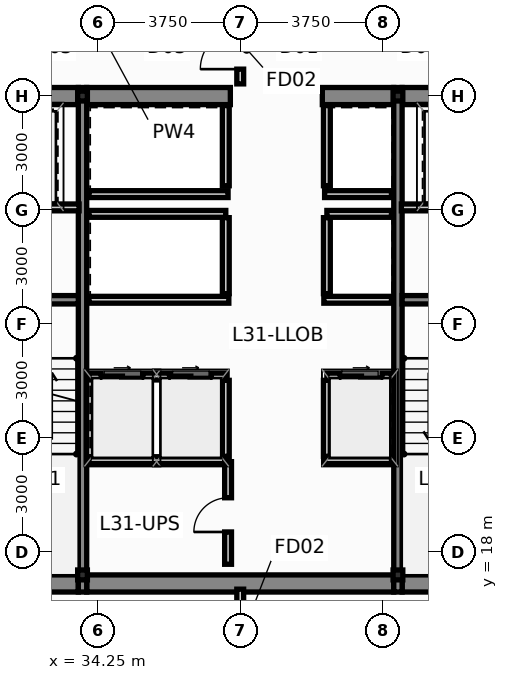
"""IFC4 building model, lengths in metres.
Left out: names, types, materials, properties, quantities, classifications, styles, units other than length and angle.
Written with IfcOpenShell. Run it as: python <this file> out.ifc"""

import sys

from ifc_helpers import new_model, si_unit, direction, frame, frame_2d, origin, origin_2d, place, context, subcontext, project, spatial, rectangle, i_section, extrude, source, transform, mapped, element, fill, save


model = new_model("IFC4")
c1 = context("Model", 3, precision=1e-05, world=origin(), true_north=direction((0.0, 1.0)))
c2 = subcontext(c1, "Body", "Model", "MODEL_VIEW")
j1 = project(units=[si_unit("LENGTHUNIT", "METRE"), si_unit("PLANEANGLEUNIT", "RADIAN")], contexts=[c1])
p1 = place(None, origin())
s1 = spatial("IfcSite", under=j1, at=p1, CompositionType="ELEMENT")
p2 = place(p1, origin())
s2 = spatial("IfcBuilding", under=s1, at=p2, CompositionType="ELEMENT")
p3 = place(p2, frame((0.0, 0.0, 120.0)))
s3 = spatial("IfcBuildingStorey", under=s2, at=p3, CompositionType="ELEMENT", Elevation=120.0)
m1 = source(origin(), c2, "Body", "SweptSolid", [
    extrude(i_section(OverallWidth=0.256, OverallDepth=0.26, WebThickness=0.01, FlangeThickness=0.017, at=origin_2d()), origin(), (0.0, 0.0, 1.0), 3.65),
])
for number, where, z_axis, x_axis in (
    (1, (33.85, 17.4, 0.0), (0.0, 0.0, 1.0), (1.0, 0.0, 0.0)),
    (2, (42.15, 17.4, 0.0), (0.0, 0.0, 1.0), (1.0, 0.0, 0.0)),
    (3, (33.85, 30.0, 0.0), (0.0, 0.0, 1.0), (1.0, 0.0, 0.0)),
    (4, (42.15, 30.0, 0.0), (0.0, 0.0, 1.0), (1.0, 0.0, 0.0)),
):
    element("IfcColumn", number, at=place(p3, frame(where, z_axis=z_axis, x_axis=x_axis)), inside=s3, PredefinedType="COLUMN", context=c2, shape_type="MappedRepresentation", body=[
        mapped(m1, transform((0.0, 0.0, 0.0), scale=1.0)),
    ])
p4 = place(p3, frame((30.84, 17.175, 0.0), z_axis=(0.0, 0.0, 1.0), x_axis=(1.0, 0.0, 0.0)))
e5 = element("IfcWall", 5, at=p4, inside=s3, PredefinedType="SHEAR", context=c2, shape_type="SweptSolid", body=[
    extrude(rectangle(XDim=2.9, YDim=0.45, at=frame_2d((1.45, 0.0))), origin(), (0.0, 0.0, 1.0), 3.65),
])
p5 = place(p3, frame((33.96, 17.175, 0.0), z_axis=(0.0, 0.0, 1.0), x_axis=(1.0, 0.0, 0.0)))
e6 = element("IfcWall", 6, at=p5, inside=s3, PredefinedType="SHEAR", context=c2, shape_type="SweptSolid", body=[
    extrude(rectangle(XDim=8.08, YDim=0.45, at=frame_2d((4.04, 0.0))), origin(), (0.0, 0.0, 1.0), 3.65),
])
for number, where, z_axis, x_axis in (
    (7, (42.26, 17.175, 0.0), (0.0, 0.0, 1.0), (1.0, 0.0, 0.0)),
    (8, (30.84, 30.0, 0.0), (0.0, 0.0, 1.0), (1.0, 0.0, 0.0)),
):
    element("IfcWall", number, at=place(p3, frame(where, z_axis=z_axis, x_axis=x_axis)), inside=s3, PredefinedType="SHEAR", context=c2, shape_type="SweptSolid", body=[
        extrude(rectangle(XDim=2.9, YDim=0.45, at=frame_2d((1.45, 0.0))), origin(), (0.0, 0.0, 1.0), 3.65),
    ])
p6 = place(p3, frame((33.96, 30.0, 0.0), z_axis=(0.0, 0.0, 1.0), x_axis=(1.0, 0.0, 0.0)))
e9 = element("IfcWall", 9, at=p6, inside=s3, PredefinedType="SHEAR", context=c2, shape_type="SweptSolid", body=[
    extrude(rectangle(XDim=3.78, YDim=0.45, at=frame_2d((1.89, 0.0))), origin(), (0.0, 0.0, 1.0), 3.65),
])
p7 = place(p3, frame((40.16, 30.0, 0.0), z_axis=(0.0, 0.0, 1.0), x_axis=(1.0, 0.0, 0.0)))
e10 = element("IfcWall", 10, at=p7, inside=s3, PredefinedType="SHEAR", context=c2, shape_type="SweptSolid", body=[
    extrude(rectangle(XDim=1.88, YDim=0.45, at=frame_2d((0.94, 0.0))), origin(), (0.0, 0.0, 1.0), 3.65),
])
p8 = place(p3, frame((42.26, 30.0, 0.0), z_axis=(0.0, 0.0, 1.0), x_axis=(1.0, 0.0, 0.0)))
e11 = element("IfcWall", 11, at=p8, inside=s3, PredefinedType="SHEAR", context=c2, shape_type="SweptSolid", body=[
    extrude(rectangle(XDim=2.9, YDim=0.45, at=frame_2d((1.45, 0.0))), origin(), (0.0, 0.0, 1.0), 3.65),
])
for number, where, z_axis, x_axis in (
    (12, (33.85, 16.95, 0.0), (0.0, 0.0, 1.0), (0.0, 1.0, 0.0)),
    (13, (42.15, 16.95, 0.0), (0.0, 0.0, 1.0), (0.0, 1.0, 0.0)),
):
    element("IfcWall", number, at=place(p3, frame(where, z_axis=z_axis, x_axis=x_axis)), inside=s3, PredefinedType="SHEAR", context=c2, shape_type="SweptSolid", body=[
        extrude(rectangle(XDim=13.275, YDim=0.22, at=frame_2d((6.638, 0.0))), origin(), (0.0, 0.0, 1.0), 3.65),
    ])
for number, where, z_axis, x_axis in (
    (14, (30.84, 24.64, 0.0), (0.0, 0.0, 1.0), (1.0, 0.0, 0.0)),
    (15, (42.26, 24.64, 0.0), (0.0, 0.0, 1.0), (1.0, 0.0, 0.0)),
):
    element("IfcWall", number, at=place(p3, frame(where, z_axis=z_axis, x_axis=x_axis)), inside=s3, PredefinedType="SHEAR", context=c2, shape_type="SweptSolid", body=[
        extrude(rectangle(XDim=2.9, YDim=0.22, at=frame_2d((1.45, 0.0))), origin(), (0.0, 0.0, 1.0), 3.65),
    ])
p9 = place(p3, frame((34.02, 22.62, 0.0), z_axis=(0.0, 0.0, 1.0), x_axis=(1.0, 0.0, 0.0)))
e16 = element("IfcWall", 16, at=p9, inside=s3, PredefinedType="PARTITIONING", context=c2, shape_type="SweptSolid", body=[
    extrude(rectangle(XDim=3.6, YDim=0.18, at=frame_2d((1.8, 0.0))), origin(), (0.0, 0.0, 1.0), 3.4),
])
p10 = place(p9, frame((0.32, 0.0, 0.0)))
e17 = element("IfcOpeningElement", 17, at=p10, cuts=e16, PredefinedType="OPENING", context=c2, shape_type="SweptSolid", body=[
    extrude(rectangle(XDim=1.1, YDim=2.2, at=frame_2d((0.55, 1.1))), frame((0.0, 0.102, 0.0), z_axis=(0.0, -1.0, 0.0), x_axis=(1.0, 0.0, 0.0)), (0.0, 0.0, 1.0), 0.204),
])
p11 = place(p9, frame((2.12, 0.0, 0.0)))
e18 = element("IfcOpeningElement", 18, at=p11, cuts=e16, PredefinedType="OPENING", context=c2, shape_type="SweptSolid", body=[
    extrude(rectangle(XDim=1.1, YDim=2.2, at=frame_2d((0.55, 1.1))), frame((0.0, 0.102, 0.0), z_axis=(0.0, -1.0, 0.0), x_axis=(1.0, 0.0, 0.0)), (0.0, 0.0, 1.0), 0.204),
])
p12 = place(p3, frame((40.28, 22.62, 0.0), z_axis=(0.0, 0.0, 1.0), x_axis=(1.0, 0.0, 0.0)))
e19 = element("IfcWall", 19, at=p12, inside=s3, PredefinedType="PARTITIONING", context=c2, shape_type="SweptSolid", body=[
    extrude(rectangle(XDim=1.7, YDim=0.18, at=frame_2d((0.85, 0.0))), origin(), (0.0, 0.0, 1.0), 3.4),
])
p13 = place(p12, frame((0.35, 0.0, 0.0)))
e20 = element("IfcOpeningElement", 20, at=p13, cuts=e19, PredefinedType="OPENING", context=c2, shape_type="SweptSolid", body=[
    extrude(rectangle(XDim=1.1, YDim=2.2, at=frame_2d((0.55, 1.1))), frame((0.0, 0.102, 0.0), z_axis=(0.0, -1.0, 0.0), x_axis=(1.0, 0.0, 0.0)), (0.0, 0.0, 1.0), 0.204),
])
for number, where, z_axis, x_axis in (
    (21, (37.62, 20.52, 0.0), (0.0, 0.0, 1.0), (0.0, 1.0, 0.0)),
    (22, (40.28, 20.52, 0.0), (0.0, 0.0, 1.0), (0.0, 1.0, 0.0)),
):
    element("IfcWall", number, at=place(p3, frame(where, z_axis=z_axis, x_axis=x_axis)), inside=s3, PredefinedType="PARTITIONING", context=c2, shape_type="SweptSolid", body=[
        extrude(rectangle(XDim=2.0, YDim=0.18, at=frame_2d((1.0, 0.0))), origin(), (0.0, 0.0, 1.0), 3.4),
    ])
p14 = place(p3, frame((34.02, 26.9, 0.0), z_axis=(0.0, 0.0, 1.0), x_axis=(1.0, 0.0, 0.0)))
e23 = element("IfcWall", 23, at=p14, inside=s3, PredefinedType="PARTITIONING", context=c2, shape_type="SweptSolid", body=[
    extrude(rectangle(XDim=3.6, YDim=0.18, at=frame_2d((1.8, 0.0))), origin(), (0.0, 0.0, 1.0), 3.4),
])
p15 = place(p3, frame((40.28, 26.9, 0.0), z_axis=(0.0, 0.0, 1.0), x_axis=(1.0, 0.0, 0.0)))
e24 = element("IfcWall", 24, at=p15, inside=s3, PredefinedType="PARTITIONING", context=c2, shape_type="SweptSolid", body=[
    extrude(rectangle(XDim=1.7, YDim=0.18, at=frame_2d((0.85, 0.0))), origin(), (0.0, 0.0, 1.0), 3.4),
])
for number, where, z_axis, x_axis in (
    (25, (37.62, 24.8, 0.0), (0.0, 0.0, 1.0), (0.0, 1.0, 0.0)),
    (26, (40.28, 24.8, 0.0), (0.0, 0.0, 1.0), (0.0, 1.0, 0.0)),
):
    element("IfcWall", number, at=place(p3, frame(where, z_axis=z_axis, x_axis=x_axis)), inside=s3, PredefinedType="PARTITIONING", context=c2, shape_type="SweptSolid", body=[
        extrude(rectangle(XDim=2.0, YDim=0.18, at=frame_2d((1.0, 0.0))), origin(), (0.0, 0.0, 1.0), 3.4),
    ])
p16 = place(p3, frame((34.02, 24.64, 0.0), z_axis=(0.0, 0.0, 1.0), x_axis=(1.0, 0.0, 0.0)))
e27 = element("IfcWall", 27, at=p16, inside=s3, PredefinedType="PARTITIONING", context=c2, shape_type="SweptSolid", body=[
    extrude(rectangle(XDim=3.68, YDim=0.18, at=frame_2d((1.84, 0.0))), origin(), (0.0, 0.0, 1.0), 3.4),
])
p17 = place(p3, frame((40.2, 24.64, 0.0), z_axis=(0.0, 0.0, 1.0), x_axis=(1.0, 0.0, 0.0)))
e28 = element("IfcWall", 28, at=p17, inside=s3, PredefinedType="PARTITIONING", context=c2, shape_type="SweptSolid", body=[
    extrude(rectangle(XDim=1.78, YDim=0.18, at=frame_2d((0.89, 0.0))), origin(), (0.0, 0.0, 1.0), 3.4),
])
p18 = place(p3, frame((34.02, 27.42, 0.0), z_axis=(0.0, 0.0, 1.0), x_axis=(1.0, 0.0, 0.0)))
e29 = element("IfcWall", 29, at=p18, inside=s3, PredefinedType="PARTITIONING", context=c2, shape_type="SweptSolid", body=[
    extrude(rectangle(XDim=3.66, YDim=0.18, at=frame_2d((1.83, 0.0))), origin(), (0.0, 0.0, 1.0), 3.4),
])
p19 = place(p3, frame((40.22, 27.42, 0.0), z_axis=(0.0, 0.0, 1.0), x_axis=(1.0, 0.0, 0.0)))
e30 = element("IfcWall", 30, at=p19, inside=s3, PredefinedType="PARTITIONING", context=c2, shape_type="SweptSolid", body=[
    extrude(rectangle(XDim=1.76, YDim=0.18, at=frame_2d((0.88, 0.0))), origin(), (0.0, 0.0, 1.0), 3.4),
])
for number, where, z_axis, x_axis in (
    (31, (37.62, 27.64, 0.0), (0.0, 0.0, 1.0), (0.0, 1.0, 0.0)),
    (32, (40.28, 27.64, 0.0), (0.0, 0.0, 1.0), (0.0, 1.0, 0.0)),
):
    element("IfcWall", number, at=place(p3, frame(where, z_axis=z_axis, x_axis=x_axis)), inside=s3, PredefinedType="PARTITIONING", context=c2, shape_type="SweptSolid", body=[
        extrude(rectangle(XDim=2.11, YDim=0.18, at=frame_2d((1.055, 0.0))), origin(), (0.0, 0.0, 1.0), 3.4),
    ])
for number, where, z_axis, x_axis in (
    (33, (30.86, 27.07, 0.0), (0.0, 0.0, 1.0), (1.0, 0.0, 0.0)),
    (34, (42.24, 27.07, 0.0), (0.0, 0.0, 1.0), (1.0, 0.0, 0.0)),
):
    element("IfcWall", number, at=place(p3, frame(where, z_axis=z_axis, x_axis=x_axis)), inside=s3, PredefinedType="PARTITIONING", context=c2, shape_type="SweptSolid", body=[
        extrude(rectangle(XDim=2.9, YDim=0.18, at=frame_2d((1.45, 0.0))), origin(), (0.0, 0.0, 1.0), 3.4),
    ])
p20 = place(p3, frame((34.02, 20.42, 0.0), z_axis=(0.0, 0.0, 1.0), x_axis=(1.0, 0.0, 0.0)))
e35 = element("IfcWall", 35, at=p20, inside=s3, PredefinedType="PARTITIONING", context=c2, shape_type="SweptSolid", body=[
    extrude(rectangle(XDim=3.64, YDim=0.18, at=frame_2d((1.82, 0.0))), origin(), (0.0, 0.0, 1.0), 3.4),
])
p21 = place(p3, frame((40.22, 20.42, 0.0), z_axis=(0.0, 0.0, 1.0), x_axis=(1.0, 0.0, 0.0)))
e36 = element("IfcWall", 36, at=p21, inside=s3, PredefinedType="PARTITIONING", context=c2, shape_type="SweptSolid", body=[
    extrude(rectangle(XDim=1.76, YDim=0.18, at=frame_2d((0.88, 0.0))), origin(), (0.0, 0.0, 1.0), 3.4),
])
p22 = place(p3, frame((37.68, 17.68, 0.0), z_axis=(0.0, 0.0, 1.0), x_axis=(0.0, 1.0, 0.0)))
e37 = element("IfcWall", 37, at=p22, inside=s3, PredefinedType="PARTITIONING", context=c2, shape_type="SweptSolid", body=[
    extrude(rectangle(XDim=2.7, YDim=0.18, at=frame_2d((1.35, 0.0))), origin(), (0.0, 0.0, 1.0), 3.4),
])
p23 = place(p22, frame((0.85, 0.0, 0.0)))
e38 = element("IfcOpeningElement", 38, at=p23, cuts=e37, PredefinedType="OPENING", context=c2, shape_type="SweptSolid", body=[
    extrude(rectangle(XDim=0.9, YDim=2.1, at=frame_2d((0.45, 1.05))), frame((0.0, 0.102, 0.0), z_axis=(0.0, -1.0, 0.0), x_axis=(1.0, 0.0, 0.0)), (0.0, 0.0, 1.0), 0.204),
])
p24 = place(p3, frame((38.0, 15.205, 0.0), z_axis=(0.0, 0.0, 1.0), x_axis=(0.0, 1.0, 0.0)))
e39 = element("IfcWall", 39, at=p24, inside=s3, PredefinedType="PARTITIONING", context=c2, shape_type="SweptSolid", body=[
    extrude(rectangle(XDim=1.82, YDim=0.18, at=frame_2d((0.91, 0.0))), origin(), (0.0, 0.0, 1.0), 3.4),
])
p25 = place(p24, frame((0.385, 0.0, 0.0)))
e40 = element("IfcOpeningElement", 40, at=p25, cuts=e39, PredefinedType="OPENING", context=c2, shape_type="SweptSolid", body=[
    extrude(rectangle(XDim=1.05, YDim=2.15, at=frame_2d((0.525, 1.075))), frame((0.0, 0.102, 0.0), z_axis=(0.0, -1.0, 0.0), x_axis=(1.0, 0.0, 0.0)), (0.0, 0.0, 1.0), 0.204),
])
p26 = place(p3, frame((38.0, 30.32, 0.0), z_axis=(0.0, 0.0, 1.0), x_axis=(0.0, 1.0, 0.0)))
e41 = element("IfcWall", 41, at=p26, inside=s3, PredefinedType="PARTITIONING", context=c2, shape_type="SweptSolid", body=[
    extrude(rectangle(XDim=1.825, YDim=0.18, at=frame_2d((0.913, 0.0))), origin(), (0.0, 0.0, 1.0), 3.4),
])
p27 = place(p26, frame((0.388, 0.0, 0.0)))
e42 = element("IfcOpeningElement", 42, at=p27, cuts=e41, PredefinedType="OPENING", context=c2, shape_type="SweptSolid", body=[
    extrude(rectangle(XDim=1.05, YDim=2.15, at=frame_2d((0.525, 1.075))), frame((0.0, 0.102, 0.0), z_axis=(0.0, -1.0, 0.0), x_axis=(1.0, 0.0, 0.0)), (0.0, 0.0, 1.0), 0.204),
])
p28 = place(p10, origin())
e43 = element("IfcDoor", 43, at=p28, inside=s3, OperationType="SLIDING_TO_LEFT", PredefinedType="DOOR", context=c2, shape_type="SweptSolid", body=[
    extrude(rectangle(XDim=1.1, YDim=2.2, at=frame_2d((0.55, 1.1))), frame((0.0, 0.025, 0.0), z_axis=(0.0, -1.0, 0.0), x_axis=(1.0, 0.0, 0.0)), (0.0, 0.0, 1.0), 0.05),
])
fill(e17, e43)
p29 = place(p11, origin())
e44 = element("IfcDoor", 44, at=p29, inside=s3, OperationType="SLIDING_TO_RIGHT", PredefinedType="DOOR", context=c2, shape_type="SweptSolid", body=[
    extrude(rectangle(XDim=1.1, YDim=2.2, at=frame_2d((0.55, 1.1))), frame((0.0, 0.025, 0.0), z_axis=(0.0, -1.0, 0.0), x_axis=(1.0, 0.0, 0.0)), (0.0, 0.0, 1.0), 0.05),
])
fill(e18, e44)
p30 = place(p13, origin())
e45 = element("IfcDoor", 45, at=p30, inside=s3, OperationType="SLIDING_TO_LEFT", PredefinedType="DOOR", context=c2, shape_type="SweptSolid", body=[
    extrude(rectangle(XDim=1.1, YDim=2.2, at=frame_2d((0.55, 1.1))), frame((0.0, 0.025, 0.0), z_axis=(0.0, -1.0, 0.0), x_axis=(1.0, 0.0, 0.0)), (0.0, 0.0, 1.0), 0.05),
])
fill(e20, e45)
p31 = place(p23, origin())
e46 = element("IfcDoor", 46, at=p31, inside=s3, OperationType="SINGLE_SWING_LEFT", PredefinedType="DOOR", context=c2, shape_type="SweptSolid", body=[
    extrude(rectangle(XDim=0.9, YDim=2.1, at=frame_2d((0.45, 1.05))), frame((0.0, 0.025, 0.0), z_axis=(0.0, -1.0, 0.0), x_axis=(1.0, 0.0, 0.0)), (0.0, 0.0, 1.0), 0.05),
])
fill(e38, e46)
p32 = place(p27, origin())
e47 = element("IfcDoor", 47, at=p32, inside=s3, OperationType="SINGLE_SWING_LEFT", PredefinedType="DOOR", context=c2, shape_type="SweptSolid", body=[
    extrude(rectangle(XDim=1.05, YDim=2.15, at=frame_2d((0.525, 1.075))), frame((0.0, 0.025, 0.0), z_axis=(0.0, -1.0, 0.0), x_axis=(1.0, 0.0, 0.0)), (0.0, 0.0, 1.0), 0.05),
])
fill(e42, e47)
save(model, sys.argv[1])
